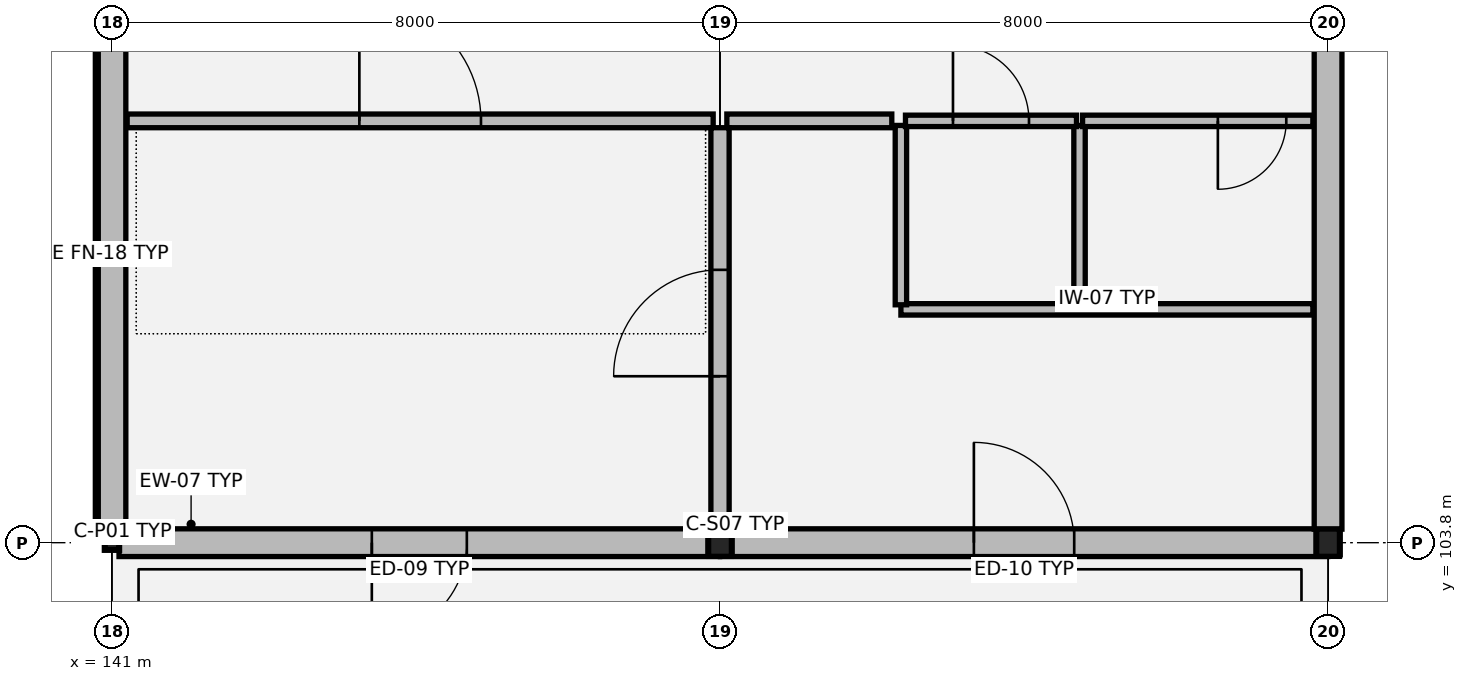
"""IFC4 building model, lengths in metres.
Left out: names, types, materials, properties, quantities, classifications, styles, units other than length and angle.
Written with IfcOpenShell. Run it as: python <this file> out.ifc"""

import sys

from ifc_helpers import new_model, si_unit, direction, frame, frame_2d, origin, origin_2d, place, context, subcontext, project, spatial, rectangle, hollow_rectangle, i_section, extrude, element, fill, save


model = new_model("IFC4")
c1 = context("Model", 3, precision=1e-05, world=origin(), true_north=direction((0.0, 1.0)))
c2 = subcontext(c1, "Body", "Model", "MODEL_VIEW")
j1 = project(units=[si_unit("LENGTHUNIT", "METRE"), si_unit("PLANEANGLEUNIT", "RADIAN")], contexts=[c1])
p1 = place(None, origin())
s1 = spatial("IfcSite", under=j1, at=p1, CompositionType="ELEMENT")
p2 = place(p1, origin())
s2 = spatial("IfcBuilding", under=s1, at=p2, CompositionType="ELEMENT")
p3 = place(p2, frame((0.0, 0.0, 21.42)))
s3 = spatial("IfcBuildingStorey", under=s2, at=p3, CompositionType="ELEMENT", Elevation=21.42)
p4 = place(p3, frame((141.0, 103.8, 0.0), z_axis=(0.0, 0.0, 1.0), x_axis=(1.0, 0.0, 0.0)))
e1 = element("IfcColumn", 1, at=p4, inside=s3, PredefinedType="COLUMN", context=c2, shape_type="SweptSolid", body=[
    extrude(hollow_rectangle(XDim=0.18, YDim=0.18, WallThickness=0.01, at=origin_2d()), origin(), (0.0, 0.0, 1.0), 3.88),
])
for number, where, z_axis, x_axis in (
    (2, (149.0, 103.8, 0.0), (0.0, 0.0, 1.0), (1.0, 0.0, 0.0)),
    (3, (157.0, 103.8, 0.0), (0.0, 0.0, 1.0), (1.0, 0.0, 0.0)),
):
    element("IfcColumn", number, at=place(p3, frame(where, z_axis=z_axis, x_axis=x_axis)), inside=s3, PredefinedType="COLUMN", context=c2, shape_type="SweptSolid", body=[
        extrude(i_section(OverallWidth=0.3, OverallDepth=0.36, WebThickness=0.012, FlangeThickness=0.022, at=origin_2d()), origin(), (0.0, 0.0, 1.0), 3.88),
    ])
p5 = place(p3, frame((141.093, 103.8, 0.0), z_axis=(0.0, 0.0, 1.0), x_axis=(1.0, 0.0, 0.0)))
e4 = element("IfcWall", 4, at=p5, inside=s3, PredefinedType="SOLIDWALL", context=c2, shape_type="SweptSolid", body=[
    extrude(rectangle(XDim=7.902, YDim=0.365, at=frame_2d((3.951, 0.0))), origin(), (0.0, 0.0, 1.0), 3.43),
])
p6 = place(p5, frame((3.326, 0.0, 0.0)))
e5 = element("IfcOpeningElement", 5, at=p6, cuts=e4, PredefinedType="OPENING", context=c2, shape_type="SweptSolid", body=[
    extrude(rectangle(XDim=1.25, YDim=2.2, at=frame_2d((0.625, 1.1))), frame((0.0, 0.192, 0.0), z_axis=(0.0, -1.0, 0.0), x_axis=(1.0, 0.0, 0.0)), (0.0, 0.0, 1.0), 0.385),
])
p7 = place(p3, frame((149.005, 103.8, 0.0), z_axis=(0.0, 0.0, 1.0), x_axis=(1.0, 0.0, 0.0)))
e6 = element("IfcWall", 6, at=p7, inside=s3, PredefinedType="SOLIDWALL", context=c2, shape_type="SweptSolid", body=[
    extrude(rectangle(XDim=7.99, YDim=0.365, at=frame_2d((3.995, 0.0))), origin(), (0.0, 0.0, 1.0), 3.43),
])
p8 = place(p7, frame((3.335, 0.0, 0.0)))
e7 = element("IfcOpeningElement", 7, at=p8, cuts=e6, PredefinedType="OPENING", context=c2, shape_type="SweptSolid", body=[
    extrude(rectangle(XDim=1.32, YDim=2.22, at=frame_2d((0.66, 1.11))), frame((0.0, 0.192, 0.0), z_axis=(0.0, -1.0, 0.0), x_axis=(1.0, 0.0, 0.0)), (0.0, 0.0, 1.0), 0.385),
])
p9 = place(p3, frame((157.0, 103.978, 0.0), z_axis=(0.0, 0.0, 1.0), x_axis=(0.0, 1.0, 0.0)))
e8 = element("IfcWall", 8, at=p9, inside=s3, PredefinedType="SOLIDWALL", context=c2, shape_type="SweptSolid", body=[
    extrude(rectangle(XDim=7.244, YDim=0.365, at=frame_2d((3.622, 0.0))), origin(), (0.0, 0.0, 1.0), 3.27),
])
p10 = place(p3, frame((141.0, 111.307, 0.0), z_axis=(0.0, 0.0, 1.0), x_axis=(0.0, -1.0, 0.0)))
e9 = element("IfcWall", 9, at=p10, inside=s3, PredefinedType="SOLIDWALL", context=c2, shape_type="SweptSolid", body=[
    extrude(rectangle(XDim=7.414, YDim=0.365, at=frame_2d((3.707, 0.0))), origin(), (0.0, 0.0, 1.0), 3.48),
])
p11 = place(p3, frame((151.38, 106.87, 0.0), z_axis=(0.0, 0.0, 1.0), x_axis=(1.0, 0.0, 0.0)))
e10 = element("IfcWall", 10, at=p11, inside=s3, PredefinedType="PARTITIONING", context=c2, shape_type="SweptSolid", body=[
    extrude(rectangle(XDim=5.42, YDim=0.15, at=frame_2d((2.71, 0.0))), origin(), (0.0, 0.0, 1.0), 3.18),
])
for number, where, z_axis, x_axis in (
    (11, (151.38, 106.93, 0.0), (0.0, 0.0, 1.0), (0.0, 1.0, 0.0)),
    (12, (153.73, 106.93, 0.0), (0.0, 0.0, 1.0), (0.0, 1.0, 0.0)),
):
    element("IfcWall", number, at=place(p3, frame(where, z_axis=z_axis, x_axis=x_axis)), inside=s3, PredefinedType="PARTITIONING", context=c2, shape_type="SweptSolid", body=[
        extrude(rectangle(XDim=2.36, YDim=0.15, at=frame_2d((1.18, 0.0))), origin(), (0.0, 0.0, 1.0), 3.18),
    ])
p12 = place(p3, frame((151.44, 109.35, 0.0), z_axis=(0.0, 0.0, 1.0), x_axis=(1.0, 0.0, 0.0)))
e13 = element("IfcWall", 13, at=p12, inside=s3, PredefinedType="PARTITIONING", context=c2, shape_type="SweptSolid", body=[
    extrude(rectangle(XDim=2.25, YDim=0.15, at=frame_2d((1.125, 0.0))), origin(), (0.0, 0.0, 1.0), 3.18),
])
p13 = place(p12, frame((0.625, 0.0, 0.0)))
e14 = element("IfcOpeningElement", 14, at=p13, cuts=e13, PredefinedType="OPENING", context=c2, shape_type="SweptSolid", body=[
    extrude(rectangle(XDim=1.0, YDim=2.15, at=frame_2d((0.5, 1.075))), frame((0.0, 0.085, 0.0), z_axis=(0.0, -1.0, 0.0), x_axis=(1.0, 0.0, 0.0)), (0.0, 0.0, 1.0), 0.17),
])
p14 = place(p3, frame((153.77, 109.35, 0.0), z_axis=(0.0, 0.0, 1.0), x_axis=(1.0, 0.0, 0.0)))
e15 = element("IfcWall", 15, at=p14, inside=s3, PredefinedType="PARTITIONING", context=c2, shape_type="SweptSolid", body=[
    extrude(rectangle(XDim=3.03, YDim=0.15, at=frame_2d((1.515, 0.0))), origin(), (0.0, 0.0, 1.0), 3.18),
])
p15 = place(p14, frame((1.78, 0.0, 0.0)))
e16 = element("IfcOpeningElement", 16, at=p15, cuts=e15, PredefinedType="OPENING", context=c2, shape_type="SweptSolid", body=[
    extrude(rectangle(XDim=0.9, YDim=2.15, at=frame_2d((0.45, 1.075))), frame((0.0, 0.085, 0.0), z_axis=(0.0, -1.0, 0.0), x_axis=(1.0, 0.0, 0.0)), (0.0, 0.0, 1.0), 0.17),
])
p16 = place(p3, frame((141.2, 109.35, 0.0), z_axis=(0.0, 0.0, 1.0), x_axis=(1.0, 0.0, 0.0)))
e17 = element("IfcWall", 17, at=p16, inside=s3, PredefinedType="PARTITIONING", context=c2, shape_type="SweptSolid", body=[
    extrude(rectangle(XDim=7.71, YDim=0.18, at=frame_2d((3.855, 0.0))), origin(), (0.0, 0.0, 1.0), 3.18),
])
p17 = place(p16, frame((3.055, 0.0, 0.0)))
e18 = element("IfcOpeningElement", 18, at=p17, cuts=e17, PredefinedType="OPENING", context=c2, shape_type="SweptSolid", body=[
    extrude(rectangle(XDim=1.6, YDim=2.25, at=frame_2d((0.8, 1.125))), frame((0.0, 0.1, 0.0), z_axis=(0.0, -1.0, 0.0), x_axis=(1.0, 0.0, 0.0)), (0.0, 0.0, 1.0), 0.2),
])
p18 = place(p3, frame((149.09, 109.35, 0.0), z_axis=(0.0, 0.0, 1.0), x_axis=(1.0, 0.0, 0.0)))
e19 = element("IfcWall", 19, at=p18, inside=s3, PredefinedType="PARTITIONING", context=c2, shape_type="SweptSolid", body=[
    extrude(rectangle(XDim=2.17, YDim=0.18, at=frame_2d((1.085, 0.0))), origin(), (0.0, 0.0, 1.0), 3.18),
])
p19 = place(p3, frame((149.0, 104.12, 0.0), z_axis=(0.0, 0.0, 1.0), x_axis=(0.0, 1.0, 0.0)))
e20 = element("IfcWall", 20, at=p19, inside=s3, PredefinedType="SOLIDWALL", context=c2, shape_type="SweptSolid", body=[
    extrude(rectangle(XDim=5.14, YDim=0.24, at=frame_2d((2.57, 0.0))), origin(), (0.0, 0.0, 1.0), 3.18),
])
p20 = place(p19, frame((1.87, 0.0, 0.0)))
e21 = element("IfcOpeningElement", 21, at=p20, cuts=e20, PredefinedType="OPENING", context=c2, shape_type="SweptSolid", body=[
    extrude(rectangle(XDim=1.4, YDim=2.22, at=frame_2d((0.7, 1.11))), frame((0.0, 0.13, 0.0), z_axis=(0.0, -1.0, 0.0), x_axis=(1.0, 0.0, 0.0)), (0.0, 0.0, 1.0), 0.26),
])
p21 = place(p6, origin())
e22 = element("IfcDoor", 22, at=p21, inside=s3, OperationType="SINGLE_SWING_RIGHT", PredefinedType="DOOR", context=c2, shape_type="SweptSolid", body=[
    extrude(rectangle(XDim=1.25, YDim=2.2, at=frame_2d((0.625, 1.1))), frame((0.0, 0.025, 0.0), z_axis=(0.0, -1.0, 0.0), x_axis=(1.0, 0.0, 0.0)), (0.0, 0.0, 1.0), 0.05),
])
fill(e5, e22)
p22 = place(p8, origin())
e23 = element("IfcDoor", 23, at=p22, inside=s3, OperationType="SINGLE_SWING_LEFT", PredefinedType="DOOR", context=c2, shape_type="SweptSolid", body=[
    extrude(rectangle(XDim=1.32, YDim=2.22, at=frame_2d((0.66, 1.11))), frame((0.0, 0.025, 0.0), z_axis=(0.0, -1.0, 0.0), x_axis=(1.0, 0.0, 0.0)), (0.0, 0.0, 1.0), 0.05),
])
fill(e7, e23)
p23 = place(p13, origin())
e24 = element("IfcDoor", 24, at=p23, inside=s3, OperationType="SINGLE_SWING_LEFT", PredefinedType="DOOR", context=c2, shape_type="SweptSolid", body=[
    extrude(rectangle(XDim=1.0, YDim=2.15, at=frame_2d((0.5, 1.075))), frame((0.0, 0.025, 0.0), z_axis=(0.0, -1.0, 0.0), x_axis=(1.0, 0.0, 0.0)), (0.0, 0.0, 1.0), 0.05),
])
fill(e14, e24)
p24 = place(p15, origin())
e25 = element("IfcDoor", 25, at=p24, inside=s3, OperationType="SINGLE_SWING_RIGHT", PredefinedType="DOOR", context=c2, shape_type="SweptSolid", body=[
    extrude(rectangle(XDim=0.9, YDim=2.15, at=frame_2d((0.45, 1.075))), frame((0.0, 0.025, 0.0), z_axis=(0.0, -1.0, 0.0), x_axis=(1.0, 0.0, 0.0)), (0.0, 0.0, 1.0), 0.05),
])
fill(e16, e25)
p25 = place(p17, origin())
e26 = element("IfcDoor", 26, at=p25, inside=s3, OperationType="DOUBLE_DOOR_SINGLE_SWING", PredefinedType="DOOR", context=c2, shape_type="SweptSolid", body=[
    extrude(rectangle(XDim=1.6, YDim=2.25, at=frame_2d((0.8, 1.125))), frame((0.0, 0.025, 0.0), z_axis=(0.0, -1.0, 0.0), x_axis=(1.0, 0.0, 0.0)), (0.0, 0.0, 1.0), 0.05),
])
fill(e18, e26)
p26 = place(p20, origin())
e27 = element("IfcDoor", 27, at=p26, inside=s3, OperationType="SINGLE_SWING_LEFT", PredefinedType="DOOR", context=c2, shape_type="SweptSolid", body=[
    extrude(rectangle(XDim=1.4, YDim=2.22, at=frame_2d((0.7, 1.11))), frame((0.0, 0.025, 0.0), z_axis=(0.0, -1.0, 0.0), x_axis=(1.0, 0.0, 0.0)), (0.0, 0.0, 1.0), 0.05),
])
fill(e21, e27)
save(model, sys.argv[1])
